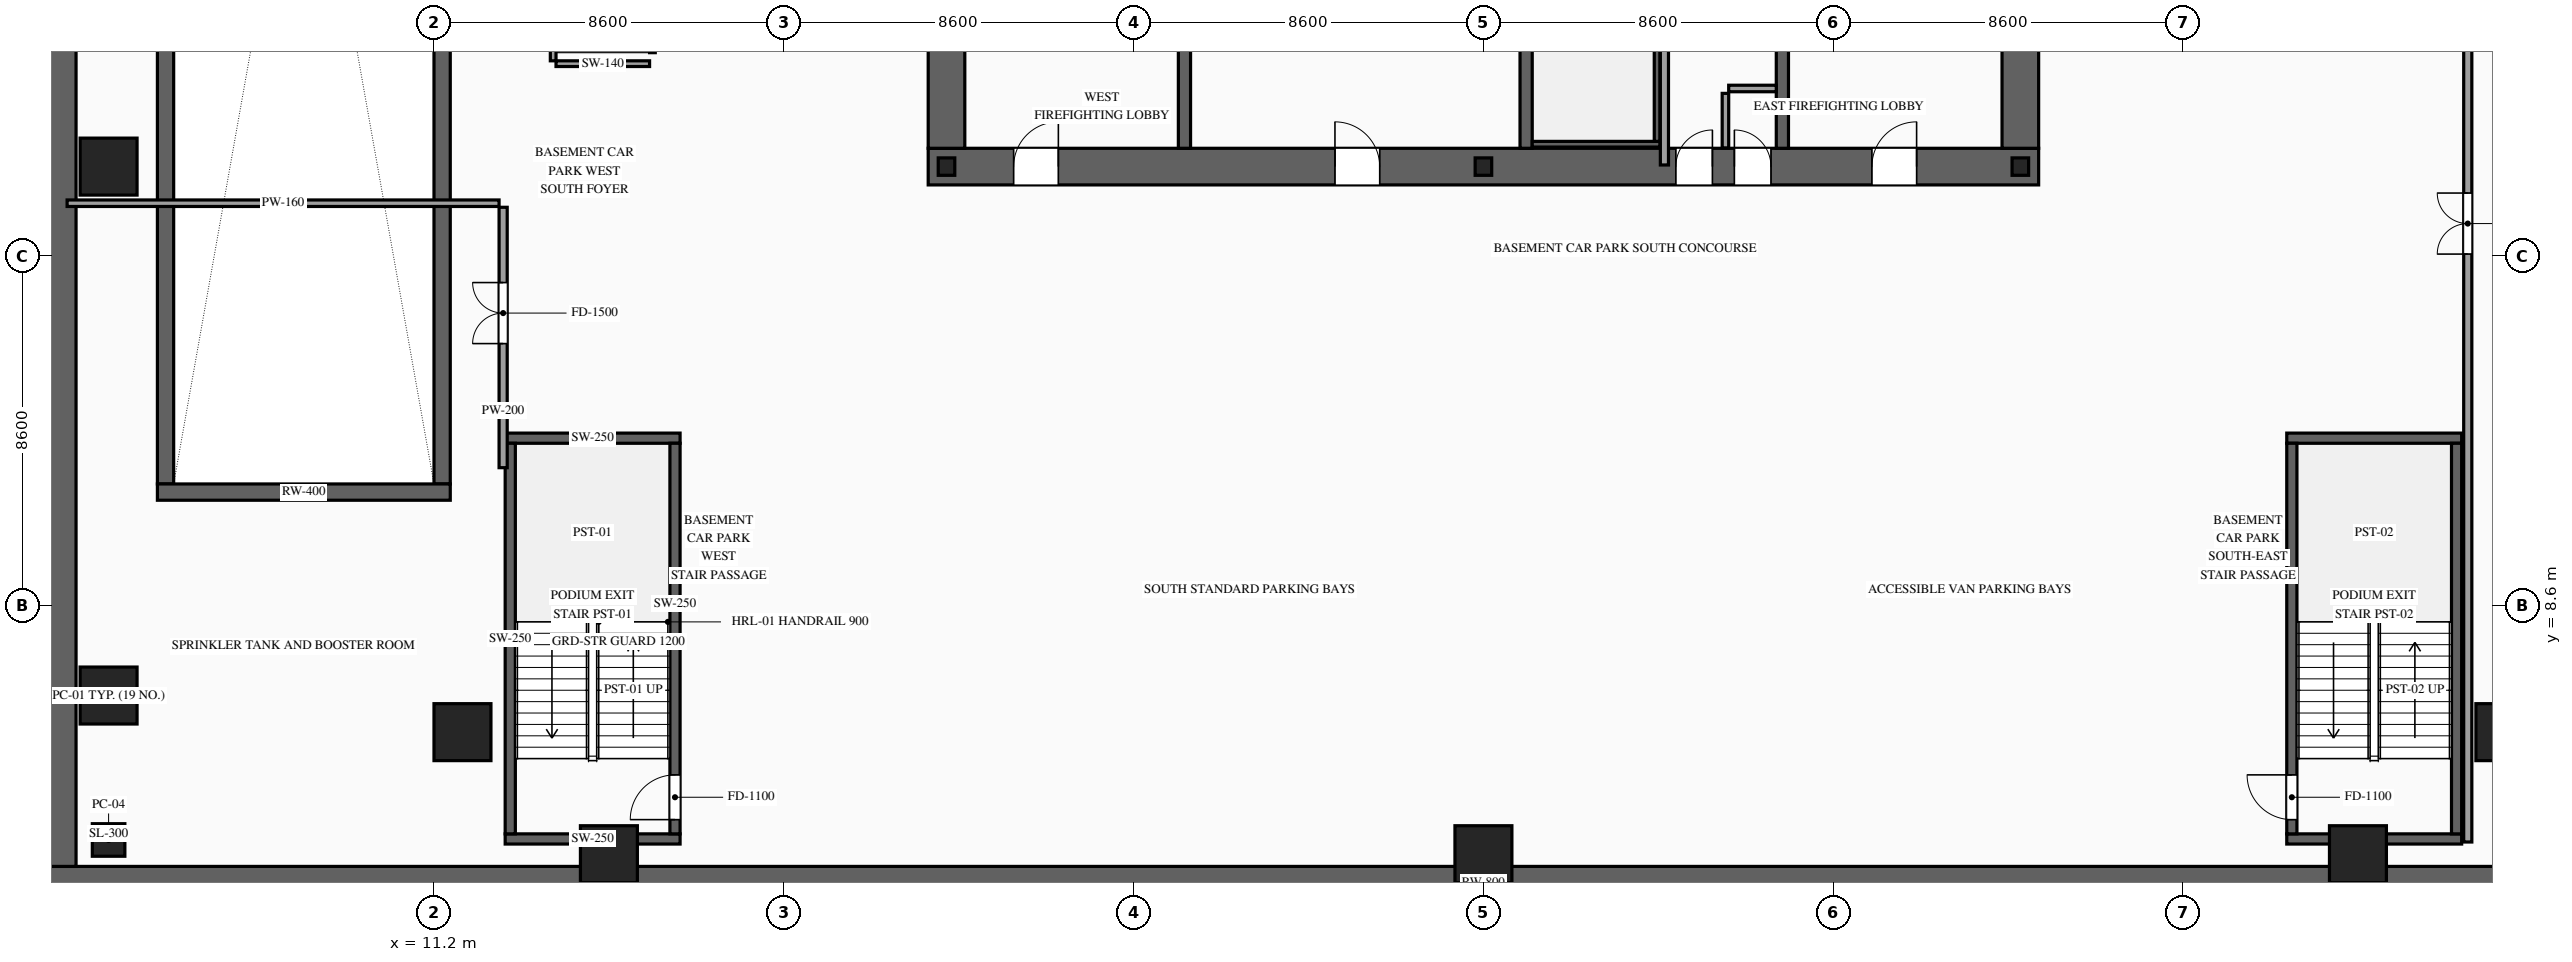
"""IFC4 building model, lengths in metres.
Left out: names, types, materials, properties, quantities, classifications, styles, units other than length and angle.
Written with IfcOpenShell. Run it as: python <this file> out.ifc"""

import sys

from ifc_helpers import new_model, si_unit, direction, frame, frame_2d, origin, origin_2d, place, context, subcontext, project, spatial, rectangle, i_section, extrude, source, transform, mapped, element, fill, save


model = new_model("IFC4")
c1 = context("Model", 3, precision=1e-05, world=origin(), true_north=direction((0.0, 1.0)))
c2 = subcontext(c1, "Body", "Model", "MODEL_VIEW")
j1 = project(units=[si_unit("LENGTHUNIT", "METRE"), si_unit("PLANEANGLEUNIT", "RADIAN")], contexts=[c1])
p1 = place(None, origin())
s1 = spatial("IfcSite", under=j1, at=p1, CompositionType="ELEMENT")
p2 = place(p1, origin())
s2 = spatial("IfcBuilding", under=s1, at=p2, CompositionType="ELEMENT")
p3 = place(p2, frame((0.0, 0.0, -4.5)))
s3 = spatial("IfcBuildingStorey", under=s2, at=p3, CompositionType="ELEMENT", Elevation=-4.5)
m1 = source(origin(), c2, "Body", "SweptSolid", [
    extrude(rectangle(XDim=70.8, YDim=0.8, at=frame_2d((35.4, 0.0))), origin(), (0.0, 0.0, 1.0), 4.5),
])
p4 = place(p3, frame((1.6, 1.8, 0.0), z_axis=(0.0, 0.0, 1.0), x_axis=(1.0, 0.0, 0.0)))
e1 = element("IfcWall", 1, at=p4, inside=s3, PredefinedType="USERDEFINED", context=c2, shape_type="MappedRepresentation", body=[
    mapped(m1, transform((0.0, 0.0, 0.0), scale=1.0)),
])
m2 = source(origin(), c2, "Body", "SweptSolid", [
    extrude(rectangle(XDim=47.2, YDim=0.8, at=frame_2d((23.6, 0.0))), origin(), (0.0, 0.0, 1.0), 4.5),
])
p5 = place(p3, frame((2.0, 2.2, 0.0), z_axis=(0.0, 0.0, 1.0), x_axis=(0.0, 1.0, 0.0)))
e2 = element("IfcWall", 2, at=p5, inside=s3, PredefinedType="USERDEFINED", context=c2, shape_type="MappedRepresentation", body=[
    mapped(m2, transform((0.0, 0.0, 0.0), scale=1.0)),
])
m3 = source(origin(), c2, "Body", "SweptSolid", [
    extrude(rectangle(XDim=36.0, YDim=0.4, at=frame_2d((18.0, 0.0))), origin(), (0.0, 0.0, 1.0), 4.5),
])
for number, where, z_axis, x_axis in (
    (3, (4.6, 11.6, 0.0), (0.0, 0.0, 1.0), (0.0, 1.0, 0.0)),
    (4, (11.4, 11.6, 0.0), (0.0, 0.0, 1.0), (0.0, 1.0, 0.0)),
):
    element("IfcWall", number, at=place(p3, frame(where, z_axis=z_axis, x_axis=x_axis)), inside=s3, PredefinedType="SOLIDWALL", context=c2, shape_type="MappedRepresentation", body=[
        mapped(m3, transform((0.0, 0.0, 0.0), scale=1.0)),
    ])
m4 = source(origin(), c2, "Body", "SweptSolid", [
    extrude(rectangle(XDim=7.2, YDim=0.4, at=frame_2d((3.6, 0.0))), origin(), (0.0, 0.0, 1.0), 4.5),
])
p6 = place(p3, frame((4.4, 11.4, 0.0), z_axis=(0.0, 0.0, 1.0), x_axis=(1.0, 0.0, 0.0)))
e5 = element("IfcWall", 5, at=p6, inside=s3, PredefinedType="SOLIDWALL", context=c2, shape_type="MappedRepresentation", body=[
    mapped(m4, transform((0.0, 0.0, 0.0), scale=1.0)),
])
p7 = place(p3, frame((23.35, 19.4, 0.0), z_axis=(0.0, 0.0, 1.0), x_axis=(1.0, 0.0, 0.0)))
e6 = element("IfcWall", 6, at=p7, inside=s3, PredefinedType="SHEAR", context=c2, shape_type="SweptSolid", body=[
    extrude(rectangle(XDim=27.3, YDim=0.9, at=frame_2d((13.65, 0.0))), origin(), (0.0, 0.0, 1.0), 4.5),
])
p8 = place(p7, frame((2.1, 0.0, 0.0)))
e7 = element("IfcOpeningElement", 7, at=p8, cuts=e6, PredefinedType="OPENING", context=c2, shape_type="SweptSolid", body=[
    extrude(rectangle(XDim=1.1, YDim=2.2, at=frame_2d((0.55, 1.1))), frame((0.0, 0.465, 0.0), z_axis=(0.0, -1.0, 0.0), x_axis=(1.0, 0.0, 0.0)), (0.0, 0.0, 1.0), 0.93),
])
p9 = place(p7, frame((10.0, 0.0, 0.0)))
e8 = element("IfcOpeningElement", 8, at=p9, cuts=e6, PredefinedType="OPENING", context=c2, shape_type="SweptSolid", body=[
    extrude(rectangle(XDim=1.1, YDim=2.2, at=frame_2d((0.55, 1.1))), frame((0.0, 0.465, 0.0), z_axis=(0.0, -1.0, 0.0), x_axis=(1.0, 0.0, 0.0)), (0.0, 0.0, 1.0), 0.93),
])
p10 = place(p7, frame((23.2, 0.0, 0.0)))
e9 = element("IfcOpeningElement", 9, at=p10, cuts=e6, PredefinedType="OPENING", context=c2, shape_type="SweptSolid", body=[
    extrude(rectangle(XDim=1.1, YDim=2.2, at=frame_2d((0.55, 1.1))), frame((0.0, 0.465, 0.0), z_axis=(0.0, -1.0, 0.0), x_axis=(1.0, 0.0, 0.0)), (0.0, 0.0, 1.0), 0.93),
])
p11 = place(p7, frame((19.82, 0.0, 0.0)))
e10 = element("IfcOpeningElement", 10, at=p11, cuts=e6, PredefinedType="OPENING", context=c2, shape_type="SweptSolid", body=[
    extrude(rectangle(XDim=0.9, YDim=2.15, at=frame_2d((0.45, 1.075))), frame((0.0, 0.465, 0.0), z_axis=(0.0, -1.0, 0.0), x_axis=(1.0, 0.0, 0.0)), (0.0, 0.0, 1.0), 0.93),
])
p12 = place(p7, frame((18.38, 0.0, 0.0)))
e11 = element("IfcOpeningElement", 11, at=p12, cuts=e6, PredefinedType="OPENING", context=c2, shape_type="SweptSolid", body=[
    extrude(rectangle(XDim=0.9, YDim=2.15, at=frame_2d((0.45, 1.075))), frame((0.0, 0.465, 0.0), z_axis=(0.0, -1.0, 0.0), x_axis=(1.0, 0.0, 0.0)), (0.0, 0.0, 1.0), 0.93),
])
m5 = source(origin(), c2, "Body", "SweptSolid", [
    extrude(rectangle(XDim=11.9, YDim=0.9, at=frame_2d((5.95, 0.0))), origin(), (0.0, 0.0, 1.0), 4.5),
])
for number, where, z_axis, x_axis in (
    (12, (23.8, 19.85, 0.0), (0.0, 0.0, 1.0), (0.0, 1.0, 0.0)),
    (13, (50.2, 19.85, 0.0), (0.0, 0.0, 1.0), (0.0, 1.0, 0.0)),
):
    element("IfcWall", number, at=place(p3, frame(where, z_axis=z_axis, x_axis=x_axis)), inside=s3, PredefinedType="SHEAR", context=c2, shape_type="MappedRepresentation", body=[
        mapped(m5, transform((0.0, 0.0, 0.0), scale=1.0)),
    ])
m6 = source(origin(), c2, "Body", "SweptSolid", [
    extrude(rectangle(XDim=11.9, YDim=0.3, at=frame_2d((5.95, 0.0))), origin(), (0.0, 0.0, 1.0), 4.5),
])
for number, where, z_axis, x_axis in (
    (14, (29.65, 19.85, 0.0), (0.0, 0.0, 1.0), (0.0, 1.0, 0.0)),
    (15, (38.05, 19.85, 0.0), (0.0, 0.0, 1.0), (0.0, 1.0, 0.0)),
    (16, (44.35, 19.85, 0.0), (0.0, 0.0, 1.0), (0.0, 1.0, 0.0)),
):
    element("IfcWall", number, at=place(p3, frame(where, z_axis=z_axis, x_axis=x_axis)), inside=s3, PredefinedType="SOLIDWALL", context=c2, shape_type="MappedRepresentation", body=[
        mapped(m6, transform((0.0, 0.0, 0.0), scale=1.0)),
    ])
m7 = source(origin(), c2, "Body", "SweptSolid", [
    extrude(i_section(OverallWidth=0.407, OverallDepth=0.428, WebThickness=0.02, FlangeThickness=0.035, at=origin_2d()), origin(), (0.0, 0.0, 1.0), 4.5),
])
for number, where, z_axis, x_axis in (
    (17, (23.8, 19.4, 0.0), (0.0, 0.0, 1.0), (1.0, 0.0, 0.0)),
    (18, (37.0, 19.4, 0.0), (0.0, 0.0, 1.0), (1.0, 0.0, 0.0)),
    (19, (50.2, 19.4, 0.0), (0.0, 0.0, 1.0), (1.0, 0.0, 0.0)),
):
    element("IfcColumn", number, at=place(p3, frame(where, z_axis=z_axis, x_axis=x_axis)), inside=s3, PredefinedType="COLUMN", context=c2, shape_type="MappedRepresentation", body=[
        mapped(m7, transform((0.0, 0.0, 0.0), scale=1.0)),
    ])
m8 = source(origin(), c2, "Body", "SweptSolid", [
    extrude(rectangle(XDim=0.8, YDim=0.8, at=origin_2d()), origin(), (0.0, 0.0, 1.0), 4.5),
])
p13 = place(p3, frame((3.2, 2.85, 0.0), z_axis=(0.0, 0.0, 1.0), x_axis=(1.0, 0.0, 0.0)))
e20 = element("IfcColumn", 20, at=p13, inside=s3, PredefinedType="COLUMN", context=c2, shape_type="MappedRepresentation", body=[
    mapped(m8, transform((0.0, 0.0, 0.0), scale=1.0)),
])
m9 = source(origin(), c2, "Body", "SweptSolid", [
    extrude(rectangle(XDim=1.4, YDim=1.4, at=origin_2d()), origin(), (0.0, 0.0, 1.0), 4.5),
])
for number, where, z_axis, x_axis in (
    (21, (3.2, 6.4, 0.0), (0.0, 0.0, 1.0), (1.0, 0.0, 0.0)),
    (22, (3.2, 19.4, 0.0), (0.0, 0.0, 1.0), (1.0, 0.0, 0.0)),
    (23, (11.9, 5.5, 0.0), (0.0, 0.0, 1.0), (1.0, 0.0, 0.0)),
    (24, (62.1, 5.5, 0.0), (0.0, 0.0, 1.0), (1.0, 0.0, 0.0)),
    (25, (15.5, 2.5, 0.0), (0.0, 0.0, 1.0), (1.0, 0.0, 0.0)),
    (26, (37.0, 2.5, 0.0), (0.0, 0.0, 1.0), (1.0, 0.0, 0.0)),
    (27, (58.5, 2.5, 0.0), (0.0, 0.0, 1.0), (1.0, 0.0, 0.0)),
):
    element("IfcColumn", number, at=place(p3, frame(where, z_axis=z_axis, x_axis=x_axis)), inside=s3, PredefinedType="COLUMN", context=c2, shape_type="MappedRepresentation", body=[
        mapped(m9, transform((0.0, 0.0, 0.0), scale=1.0)),
    ])
m10 = source(origin(), c2, "Body", "SweptSolid", [
    extrude(rectangle(XDim=5.8, YDim=0.14, at=frame_2d((2.9, 0.0))), origin(), (0.0, 0.0, 1.0), 4.2),
])
p14 = place(p3, frame((14.13, 22.0, 0.0), z_axis=(0.0, 0.0, 1.0), x_axis=(0.0, 1.0, 0.0)))
e28 = element("IfcWall", 28, at=p14, inside=s3, PredefinedType="SOLIDWALL", context=c2, shape_type="MappedRepresentation", body=[
    mapped(m10, transform((0.0, 0.0, 0.0), scale=1.0)),
])
m11 = source(origin(), c2, "Body", "SweptSolid", [
    extrude(rectangle(XDim=2.3, YDim=0.14, at=frame_2d((1.15, 0.0))), origin(), (0.0, 0.0, 1.0), 4.2),
])
p15 = place(p3, frame((14.2, 21.93, 0.0), z_axis=(0.0, 0.0, 1.0), x_axis=(1.0, 0.0, 0.0)))
e29 = element("IfcWall", 29, at=p15, inside=s3, PredefinedType="SOLIDWALL", context=c2, shape_type="MappedRepresentation", body=[
    mapped(m11, transform((0.0, 0.0, 0.0), scale=1.0)),
])
m12 = source(origin(), c2, "Body", "SweptSolid", [
    extrude(rectangle(XDim=3.14, YDim=0.14, at=frame_2d((1.57, 0.0))), origin(), (0.0, 0.0, 1.0), 4.2),
])
p16 = place(p3, frame((38.2, 19.95, 0.0), z_axis=(0.0, 0.0, 1.0), x_axis=(1.0, 0.0, 0.0)))
e30 = element("IfcWall", 30, at=p16, inside=s3, PredefinedType="SOLIDWALL", context=c2, shape_type="MappedRepresentation", body=[
    mapped(m12, transform((0.0, 0.0, 0.0), scale=1.0)),
])
m13 = source(origin(), c2, "Body", "SweptSolid", [
    extrude(rectangle(XDim=8.94, YDim=0.14, at=frame_2d((4.47, 0.0))), origin(), (0.0, 0.0, 1.0), 4.2),
])
p17 = place(p3, frame((41.27, 20.02, 0.0), z_axis=(0.0, 0.0, 1.0), x_axis=(0.0, 1.0, 0.0)))
e31 = element("IfcWall", 31, at=p17, inside=s3, PredefinedType="SOLIDWALL", context=c2, shape_type="MappedRepresentation", body=[
    mapped(m13, transform((0.0, 0.0, 0.0), scale=1.0)),
])
m14 = source(origin(), c2, "Body", "SweptSolid", [
    extrude(rectangle(XDim=4.3, YDim=0.25, at=frame_2d((2.15, 0.0))), origin(), (0.0, 0.0, 1.0), 4.2),
])
for number, where, z_axis, x_axis in (
    (32, (12.95, 2.875, 0.0), (0.0, 0.0, 1.0), (1.0, 0.0, 0.0)),
    (33, (12.95, 12.725, 0.0), (0.0, 0.0, 1.0), (1.0, 0.0, 0.0)),
):
    element("IfcWall", number, at=place(p3, frame(where, z_axis=z_axis, x_axis=x_axis)), inside=s3, PredefinedType="SOLIDWALL", context=c2, shape_type="MappedRepresentation", body=[
        mapped(m14, transform((0.0, 0.0, 0.0), scale=1.0)),
    ])
m15 = source(origin(), c2, "Body", "SweptSolid", [
    extrude(rectangle(XDim=9.6, YDim=0.25, at=frame_2d((4.8, 0.0))), origin(), (0.0, 0.0, 1.0), 4.2),
])
p18 = place(p3, frame((13.075, 3.0, 0.0), z_axis=(0.0, 0.0, 1.0), x_axis=(0.0, 1.0, 0.0)))
e34 = element("IfcWall", 34, at=p18, inside=s3, PredefinedType="SOLIDWALL", context=c2, shape_type="MappedRepresentation", body=[
    mapped(m15, transform((0.0, 0.0, 0.0), scale=1.0)),
])
p19 = place(p3, frame((17.125, 3.0, 0.0), z_axis=(0.0, 0.0, 1.0), x_axis=(0.0, 1.0, 0.0)))
e35 = element("IfcWall", 35, at=p19, inside=s3, PredefinedType="SOLIDWALL", context=c2, shape_type="SweptSolid", body=[
    extrude(rectangle(XDim=9.6, YDim=0.25, at=frame_2d((4.8, 0.0))), origin(), (0.0, 0.0, 1.0), 4.2),
])
p20 = place(p19, frame((0.35, 0.0, 0.0)))
e36 = element("IfcOpeningElement", 36, at=p20, cuts=e35, PredefinedType="OPENING", context=c2, shape_type="SweptSolid", body=[
    extrude(rectangle(XDim=1.1, YDim=2.2, at=frame_2d((0.55, 1.1))), frame((0.0, 0.14, 0.0), z_axis=(0.0, -1.0, 0.0), x_axis=(1.0, 0.0, 0.0)), (0.0, 0.0, 1.0), 0.28),
])
for number, where, z_axis, x_axis in (
    (37, (56.75, 2.875, 0.0), (0.0, 0.0, 1.0), (1.0, 0.0, 0.0)),
    (38, (56.75, 12.725, 0.0), (0.0, 0.0, 1.0), (1.0, 0.0, 0.0)),
):
    element("IfcWall", number, at=place(p3, frame(where, z_axis=z_axis, x_axis=x_axis)), inside=s3, PredefinedType="SOLIDWALL", context=c2, shape_type="MappedRepresentation", body=[
        mapped(m14, transform((0.0, 0.0, 0.0), scale=1.0)),
    ])
p21 = place(p3, frame((56.875, 3.0, 0.0), z_axis=(0.0, 0.0, 1.0), x_axis=(0.0, 1.0, 0.0)))
e39 = element("IfcWall", 39, at=p21, inside=s3, PredefinedType="SOLIDWALL", context=c2, shape_type="SweptSolid", body=[
    extrude(rectangle(XDim=9.6, YDim=0.25, at=frame_2d((4.8, 0.0))), origin(), (0.0, 0.0, 1.0), 4.2),
])
p22 = place(p21, frame((0.35, 0.0, 0.0)))
e40 = element("IfcOpeningElement", 40, at=p22, cuts=e39, PredefinedType="OPENING", context=c2, shape_type="SweptSolid", body=[
    extrude(rectangle(XDim=1.1, YDim=2.2, at=frame_2d((0.55, 1.1))), frame((0.0, 0.14, 0.0), z_axis=(0.0, -1.0, 0.0), x_axis=(1.0, 0.0, 0.0)), (0.0, 0.0, 1.0), 0.28),
])
p23 = place(p3, frame((60.925, 3.0, 0.0), z_axis=(0.0, 0.0, 1.0), x_axis=(0.0, 1.0, 0.0)))
e41 = element("IfcWall", 41, at=p23, inside=s3, PredefinedType="SOLIDWALL", context=c2, shape_type="MappedRepresentation", body=[
    mapped(m15, transform((0.0, 0.0, 0.0), scale=1.0)),
])
m16 = source(origin(), c2, "Body", "SweptSolid", [
    extrude(rectangle(XDim=1.34, YDim=0.16, at=frame_2d((0.67, 0.0))), origin(), (0.0, 0.0, 1.0), 4.2),
])
p24 = place(p3, frame((42.95, 19.86, 0.0), z_axis=(0.0, 0.0, 1.0), x_axis=(0.0, 1.0, 0.0)))
e42 = element("IfcWall", 42, at=p24, inside=s3, PredefinedType="PARTITIONING", context=c2, shape_type="MappedRepresentation", body=[
    mapped(m16, transform((0.0, 0.0, 0.0), scale=1.0)),
])
m17 = source(origin(), c2, "Body", "SweptSolid", [
    extrude(rectangle(XDim=1.17, YDim=0.16, at=frame_2d((0.585, 0.0))), origin(), (0.0, 0.0, 1.0), 4.2),
])
p25 = place(p3, frame((43.03, 21.32, 0.0), z_axis=(0.0, 0.0, 1.0), x_axis=(1.0, 0.0, 0.0)))
e43 = element("IfcWall", 43, at=p25, inside=s3, PredefinedType="PARTITIONING", context=c2, shape_type="MappedRepresentation", body=[
    mapped(m17, transform((0.0, 0.0, 0.0), scale=1.0)),
])
m18 = source(origin(), c2, "Body", "SweptSolid", [
    extrude(rectangle(XDim=6.51, YDim=0.2, at=frame_2d((3.255, 0.0))), origin(), (0.0, 0.0, 1.0), 4.2),
])
p26 = place(p3, frame((41.45, 19.44, 0.0), z_axis=(0.0, 0.0, 1.0), x_axis=(0.0, 1.0, 0.0)))
e44 = element("IfcWall", 44, at=p26, inside=s3, PredefinedType="PARTITIONING", context=c2, shape_type="MappedRepresentation", body=[
    mapped(m18, transform((0.0, 0.0, 0.0), scale=1.0)),
])
p27 = place(p3, frame((61.2, 2.8, 0.0), z_axis=(0.0, 0.0, 1.0), x_axis=(0.0, 1.0, 0.0)))
e45 = element("IfcWall", 45, at=p27, inside=s3, PredefinedType="PARTITIONING", context=c2, shape_type="SweptSolid", body=[
    extrude(rectangle(XDim=21.6, YDim=0.2, at=frame_2d((10.8, 0.0))), origin(), (0.0, 0.0, 1.0), 4.2),
])
p28 = place(p27, frame((14.45, 0.0, 0.0)))
e46 = element("IfcOpeningElement", 46, at=p28, cuts=e45, PredefinedType="OPENING", context=c2, shape_type="SweptSolid", body=[
    extrude(rectangle(XDim=1.5, YDim=2.3, at=frame_2d((0.75, 1.15))), frame((0.0, 0.115, 0.0), z_axis=(0.0, -1.0, 0.0), x_axis=(1.0, 0.0, 0.0)), (0.0, 0.0, 1.0), 0.23),
])
p29 = place(p3, frame((12.9, 12.0, 0.0), z_axis=(0.0, 0.0, 1.0), x_axis=(0.0, 1.0, 0.0)))
e47 = element("IfcWall", 47, at=p29, inside=s3, PredefinedType="PARTITIONING", context=c2, shape_type="SweptSolid", body=[
    extrude(rectangle(XDim=6.4, YDim=0.2, at=frame_2d((3.2, 0.0))), origin(), (0.0, 0.0, 1.0), 4.2),
])
p30 = place(p29, frame((3.05, 0.0, 0.0)))
e48 = element("IfcOpeningElement", 48, at=p30, cuts=e47, PredefinedType="OPENING", context=c2, shape_type="SweptSolid", body=[
    extrude(rectangle(XDim=1.5, YDim=2.3, at=frame_2d((0.75, 1.15))), frame((0.0, 0.115, 0.0), z_axis=(0.0, -1.0, 0.0), x_axis=(1.0, 0.0, 0.0)), (0.0, 0.0, 1.0), 0.23),
])
m19 = source(origin(), c2, "Body", "SweptSolid", [
    extrude(rectangle(XDim=10.62, YDim=0.16, at=frame_2d((5.31, 0.0))), origin(), (0.0, 0.0, 1.0), 4.2),
])
p31 = place(p3, frame((2.18, 18.5, 0.0), z_axis=(0.0, 0.0, 1.0), x_axis=(1.0, 0.0, 0.0)))
e49 = element("IfcWall", 49, at=p31, inside=s3, PredefinedType="PARTITIONING", context=c2, shape_type="MappedRepresentation", body=[
    mapped(m19, transform((0.0, 0.0, 0.0), scale=1.0)),
])
m20 = source(origin(), c2, "Body", "SweptSolid", [
    extrude(rectangle(XDim=1.1, YDim=2.2, at=frame_2d((0.55, 1.1))), frame((0.0, 0.025, 0.0), z_axis=(0.0, -1.0, 0.0), x_axis=(1.0, 0.0, 0.0)), (0.0, 0.0, 1.0), 0.05),
])
p32 = place(p20, origin())
e50 = element("IfcDoor", 50, at=p32, inside=s3, OperationType="SINGLE_SWING_LEFT", PredefinedType="DOOR", context=c2, shape_type="MappedRepresentation", body=[
    mapped(m20, transform((0.0, 0.0, 0.0), scale=1.0)),
])
fill(e36, e50)
p33 = place(p22, origin())
e51 = element("IfcDoor", 51, at=p33, inside=s3, OperationType="SINGLE_SWING_RIGHT", PredefinedType="DOOR", context=c2, shape_type="MappedRepresentation", body=[
    mapped(m20, transform((0.0, 0.0, 0.0), scale=1.0)),
])
fill(e40, e51)
p34 = place(p8, origin())
e52 = element("IfcDoor", 52, at=p34, inside=s3, OperationType="SINGLE_SWING_RIGHT", PredefinedType="DOOR", context=c2, shape_type="MappedRepresentation", body=[
    mapped(m20, transform((0.0, 0.0, 0.0), scale=1.0)),
])
fill(e7, e52)
p35 = place(p9, origin())
e53 = element("IfcDoor", 53, at=p35, inside=s3, OperationType="SINGLE_SWING_LEFT", PredefinedType="DOOR", context=c2, shape_type="MappedRepresentation", body=[
    mapped(m20, transform((0.0, 0.0, 0.0), scale=1.0)),
])
fill(e8, e53)
p36 = place(p10, origin())
e54 = element("IfcDoor", 54, at=p36, inside=s3, OperationType="SINGLE_SWING_RIGHT", PredefinedType="DOOR", context=c2, shape_type="MappedRepresentation", body=[
    mapped(m20, transform((0.0, 0.0, 0.0), scale=1.0)),
])
fill(e9, e54)
m21 = source(origin(), c2, "Body", "SweptSolid", [
    extrude(rectangle(XDim=0.9, YDim=2.15, at=frame_2d((0.45, 1.075))), frame((0.0, 0.025, 0.0), z_axis=(0.0, -1.0, 0.0), x_axis=(1.0, 0.0, 0.0)), (0.0, 0.0, 1.0), 0.05),
])
p37 = place(p11, origin())
e55 = element("IfcDoor", 55, at=p37, inside=s3, OperationType="SINGLE_SWING_LEFT", PredefinedType="DOOR", context=c2, shape_type="MappedRepresentation", body=[
    mapped(m21, transform((0.0, 0.0, 0.0), scale=1.0)),
])
fill(e10, e55)
p38 = place(p12, origin())
e56 = element("IfcDoor", 56, at=p38, inside=s3, OperationType="SINGLE_SWING_RIGHT", PredefinedType="DOOR", context=c2, shape_type="MappedRepresentation", body=[
    mapped(m21, transform((0.0, 0.0, 0.0), scale=1.0)),
])
fill(e11, e56)
m22 = source(origin(), c2, "Body", "SweptSolid", [
    extrude(rectangle(XDim=1.5, YDim=2.3, at=frame_2d((0.75, 1.15))), frame((0.0, 0.025, 0.0), z_axis=(0.0, -1.0, 0.0), x_axis=(1.0, 0.0, 0.0)), (0.0, 0.0, 1.0), 0.05),
])
p39 = place(p28, origin())
e57 = element("IfcDoor", 57, at=p39, inside=s3, OperationType="DOUBLE_DOOR_SINGLE_SWING", PredefinedType="DOOR", context=c2, shape_type="MappedRepresentation", body=[
    mapped(m22, transform((0.0, 0.0, 0.0), scale=1.0)),
])
fill(e46, e57)
p40 = place(p30, origin())
e58 = element("IfcDoor", 58, at=p40, inside=s3, OperationType="DOUBLE_DOOR_SINGLE_SWING", PredefinedType="DOOR", context=c2, shape_type="MappedRepresentation", body=[
    mapped(m22, transform((0.0, 0.0, 0.0), scale=1.0)),
])
fill(e48, e58)
save(model, sys.argv[1])
